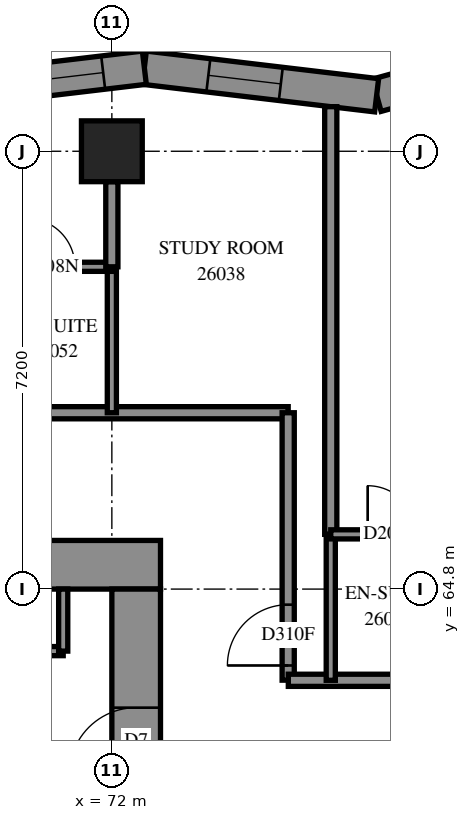
"""IFC4 building model, lengths in metres.
Left out: names, types, materials, properties, quantities, classifications, styles, units other than length and angle.
Written with IfcOpenShell. Run it as: python <this file> out.ifc"""

import sys

from ifc_helpers import new_model, si_unit, direction, frame, frame_2d, origin, origin_2d, place, context, subcontext, project, spatial, polyline, rectangle, outline, extrude, element, fill, save


model = new_model("IFC4")
c1 = context("Model", 3, precision=1e-05, world=origin(), true_north=direction((0.0, 1.0)))
c2 = subcontext(c1, "Body", "Model", "MODEL_VIEW")
j1 = project(units=[si_unit("LENGTHUNIT", "METRE"), si_unit("PLANEANGLEUNIT", "RADIAN")], contexts=[c1])
p1 = place(None, origin())
s1 = spatial("IfcSite", under=j1, at=p1, CompositionType="ELEMENT")
p2 = place(p1, origin())
s2 = spatial("IfcBuilding", under=s1, at=p2, CompositionType="ELEMENT")
p3 = place(p2, frame((0.0, 0.0, 98.2)))
s3 = spatial("IfcBuildingStorey", under=s2, at=p3, CompositionType="ELEMENT", Elevation=98.2)
p4 = place(p3, frame((72.0, 72.0, 0.0), z_axis=(0.0, 0.0, 1.0), x_axis=(1.0, 0.0, 0.0)))
e1 = element("IfcColumn", 1, at=p4, inside=s3, PredefinedType="COLUMN", context=c2, shape_type="SweptSolid", body=[
    extrude(rectangle(XDim=1.0, YDim=1.0, at=origin_2d()), origin(), (0.0, 0.0, 1.0), 3.1),
])
p5 = place(p3, frame((56.8, 65.2, -0.3), z_axis=(0.0, 0.0, 1.0), x_axis=(1.0, 0.0, 0.0)))
e2 = element("IfcWall", 2, at=p5, inside=s3, PredefinedType="SHEAR", context=c2, shape_type="SweptSolid", body=[
    extrude(rectangle(XDim=16.0, YDim=0.8, at=frame_2d((8.0, 0.0))), origin(), (0.0, 0.0, 1.0), 2.7),
])
p6 = place(p5, frame((10.8, 0.0, 0.3)))
e3 = element("IfcOpeningElement", 3, at=p6, cuts=e2, PredefinedType="OPENING", context=c2, shape_type="SweptSolid", body=[
    extrude(rectangle(XDim=0.8, YDim=2.1, at=frame_2d((0.4, 1.05))), frame((0.0, 0.41, 0.0), z_axis=(0.0, -1.0, 0.0), x_axis=(1.0, 0.0, 0.0)), (0.0, 0.0, 1.0), 0.82),
])
p7 = place(p3, frame((72.4, 50.4, -0.3), z_axis=(0.0, 0.0, 1.0), x_axis=(0.0, 1.0, 0.0)))
e4 = element("IfcWall", 4, at=p7, inside=s3, PredefinedType="SHEAR", context=c2, shape_type="SweptSolid", body=[
    extrude(rectangle(XDim=14.4, YDim=0.8, at=frame_2d((7.2, 0.0))), origin(), (0.0, 0.0, 1.0), 2.7),
])
p8 = place(p7, frame((4.55, 0.0, 0.3)))
e5 = element("IfcOpeningElement", 5, at=p8, cuts=e4, PredefinedType="OPENING", context=c2, shape_type="SweptSolid", body=[
    extrude(rectangle(XDim=1.1, YDim=2.1, at=frame_2d((0.55, 1.05))), frame((0.0, 0.41, 0.0), z_axis=(0.0, -1.0, 0.0), x_axis=(1.0, 0.0, 0.0)), (0.0, 0.0, 1.0), 0.82),
])
p9 = place(p7, frame((11.35, 0.0, 0.3)))
e6 = element("IfcOpeningElement", 6, at=p9, cuts=e4, PredefinedType="OPENING", context=c2, shape_type="SweptSolid", body=[
    extrude(rectangle(XDim=1.1, YDim=2.1, at=frame_2d((0.55, 1.05))), frame((0.0, 0.41, 0.0), z_axis=(0.0, -1.0, 0.0), x_axis=(1.0, 0.0, 0.0)), (0.0, 0.0, 1.0), 0.82),
])
p10 = place(p3, frame((79.993, 73.927, 0.0), z_axis=(0.0, 0.0, 1.0), x_axis=(-0.9637944631, -0.2666462691, 0.0)))
e7 = element("IfcWall", 7, at=p10, inside=s3, PredefinedType="SOLIDWALL", context=c2, shape_type="SweptSolid", body=[
    extrude(outline(polyline([(-0.221, -0.275), (3.721, -0.275), (3.829, 0.275), (0.221, 0.275), (-0.221, -0.275)])), origin(), (0.0, 0.0, 1.0), 3.1),
])
p11 = place(p10, frame((1.599, 0.0, 0.5)))
e8 = element("IfcOpeningElement", 8, at=p11, cuts=e7, PredefinedType="OPENING", context=c2, shape_type="SweptSolid", body=[
    extrude(rectangle(XDim=1.2, YDim=2.45, at=frame_2d((0.6, 1.225))), frame((0.0, 0.285, 0.0), z_axis=(0.0, -1.0, 0.0), x_axis=(1.0, 0.0, 0.0)), (0.0, 0.0, 1.0), 0.57),
])
p12 = place(p3, frame((76.355, 72.921, 0.0), z_axis=(0.0, 0.0, 1.0), x_axis=(-0.9930244072, 0.1179089763, 0.0)))
e9 = element("IfcWall", 9, at=p12, inside=s3, PredefinedType="SOLIDWALL", context=c2, shape_type="SweptSolid", body=[
    extrude(outline(polyline([(0.054, -0.275), (3.88, -0.275), (3.814, 0.275), (-0.054, 0.275), (0.054, -0.275)])), origin(), (0.0, 0.0, 1.0), 3.1),
])
p13 = place(p12, frame((1.587, 0.0, 0.5)))
e10 = element("IfcOpeningElement", 10, at=p13, cuts=e9, PredefinedType="OPENING", context=c2, shape_type="SweptSolid", body=[
    extrude(rectangle(XDim=1.2, YDim=2.45, at=frame_2d((0.6, 1.225))), frame((0.0, 0.285, 0.0), z_axis=(0.0, -1.0, 0.0), x_axis=(1.0, 0.0, 0.0)), (0.0, 0.0, 1.0), 0.57),
])
p14 = place(p3, frame((72.534, 73.374, 0.0), z_axis=(0.0, 0.0, 1.0), x_axis=(-0.9930269402, -0.1178876415, 0.0)))
e11 = element("IfcWall", 11, at=p14, inside=s3, PredefinedType="SOLIDWALL", context=c2, shape_type="SweptSolid", body=[
    extrude(outline(polyline([(-0.033, -0.275), (3.793, -0.275), (3.858, 0.275), (0.033, 0.275), (-0.033, -0.275)])), origin(), (0.0, 0.0, 1.0), 3.1),
])
p15 = place(p14, frame((0.682, 0.0, 0.5)))
e12 = element("IfcOpeningElement", 12, at=p15, cuts=e11, PredefinedType="OPENING", context=c2, shape_type="SweptSolid", body=[
    extrude(rectangle(XDim=1.3, YDim=2.45, at=frame_2d((0.65, 1.225))), frame((0.0, 0.285, 0.0), z_axis=(0.0, -1.0, 0.0), x_axis=(1.0, 0.0, 0.0)), (0.0, 0.0, 1.0), 0.57),
])
p16 = place(p14, frame((2.182, 0.0, 0.5)))
e13 = element("IfcOpeningElement", 13, at=p16, cuts=e11, PredefinedType="OPENING", context=c2, shape_type="SweptSolid", body=[
    extrude(rectangle(XDim=1.3, YDim=2.45, at=frame_2d((0.65, 1.225))), frame((0.0, 0.285, 0.0), z_axis=(0.0, -1.0, 0.0), x_axis=(1.0, 0.0, 0.0)), (0.0, 0.0, 1.0), 0.57),
])
p17 = place(p3, frame((64.95, 63.78, 0.0), z_axis=(0.0, 0.0, 1.0), x_axis=(1.0, 0.0, 0.0)))
e14 = element("IfcWall", 14, at=p17, inside=s3, PredefinedType="PARTITIONING", context=c2, shape_type="SweptSolid", body=[
    extrude(rectangle(XDim=6.25, YDim=0.15, at=frame_2d((3.125, 0.0))), origin(), (0.0, 0.0, 1.0), 3.1),
])
p18 = place(p3, frame((71.2, 63.78, 0.0), z_axis=(0.0, 0.0, 1.0), x_axis=(0.0, 1.0, 0.0)))
e15 = element("IfcWall", 15, at=p18, inside=s3, PredefinedType="PARTITIONING", context=c2, shape_type="SweptSolid", body=[
    extrude(rectangle(XDim=1.02, YDim=0.15, at=frame_2d((0.51, 0.0))), origin(), (0.0, 0.0, 1.0), 3.1),
])
p19 = place(p3, frame((54.7, 67.7, 0.0), z_axis=(0.0, 0.0, 1.0), x_axis=(1.0, 0.0, 0.0)))
e16 = element("IfcWall", 16, at=p19, inside=s3, PredefinedType="PARTITIONING", context=c2, shape_type="SweptSolid", body=[
    extrude(rectangle(XDim=20.2, YDim=0.2, at=frame_2d((10.1, 0.0))), origin(), (0.0, 0.0, 1.0), 3.1),
])
p20 = place(p19, frame((5.25, 0.0, 0.0)))
e17 = element("IfcOpeningElement", 17, at=p20, cuts=e16, PredefinedType="OPENING", context=c2, shape_type="SweptSolid", body=[
    extrude(rectangle(XDim=0.9, YDim=2.1, at=frame_2d((0.45, 1.05))), frame((0.0, 0.11, 0.0), z_axis=(0.0, -1.0, 0.0), x_axis=(1.0, 0.0, 0.0)), (0.0, 0.0, 1.0), 0.22),
])
p21 = place(p19, frame((6.9, 0.0, 0.0)))
e18 = element("IfcOpeningElement", 18, at=p21, cuts=e16, PredefinedType="OPENING", context=c2, shape_type="SweptSolid", body=[
    extrude(rectangle(XDim=0.9, YDim=2.1, at=frame_2d((0.45, 1.05))), frame((0.0, 0.11, 0.0), z_axis=(0.0, -1.0, 0.0), x_axis=(1.0, 0.0, 0.0)), (0.0, 0.0, 1.0), 0.22),
])
p22 = place(p19, frame((12.45, 0.0, 0.0)))
e19 = element("IfcOpeningElement", 19, at=p22, cuts=e16, PredefinedType="OPENING", context=c2, shape_type="SweptSolid", body=[
    extrude(rectangle(XDim=0.9, YDim=2.1, at=frame_2d((0.45, 1.05))), frame((0.0, 0.11, 0.0), z_axis=(0.0, -1.0, 0.0), x_axis=(1.0, 0.0, 0.0)), (0.0, 0.0, 1.0), 0.22),
])
p23 = place(p19, frame((14.1, 0.0, 0.0)))
e20 = element("IfcOpeningElement", 20, at=p23, cuts=e16, PredefinedType="OPENING", context=c2, shape_type="SweptSolid", body=[
    extrude(rectangle(XDim=0.9, YDim=2.1, at=frame_2d((0.45, 1.05))), frame((0.0, 0.11, 0.0), z_axis=(0.0, -1.0, 0.0), x_axis=(1.0, 0.0, 0.0)), (0.0, 0.0, 1.0), 0.22),
])
p24 = place(p3, frame((75.6, 65.7, 0.0), z_axis=(0.0, 0.0, 1.0), x_axis=(0.0, 1.0, 0.0)))
e21 = element("IfcWall", 21, at=p24, inside=s3, PredefinedType="PARTITIONING", context=c2, shape_type="SweptSolid", body=[
    extrude(rectangle(XDim=7.033, YDim=0.2, at=frame_2d((3.517, 0.0))), origin(), (0.0, 0.0, 1.0), 3.1),
])
p25 = place(p3, frame((74.9, 63.302, 0.0), z_axis=(0.0, 0.0, 1.0), x_axis=(0.0, 1.0, 0.0)))
e22 = element("IfcWall", 22, at=p25, inside=s3, PredefinedType="PARTITIONING", context=c2, shape_type="SweptSolid", body=[
    extrude(rectangle(XDim=4.398, YDim=0.2, at=frame_2d((2.199, 0.0))), origin(), (0.0, 0.0, 1.0), 3.1),
])
p26 = place(p25, frame((0.242, 0.0, 0.0)))
e23 = element("IfcOpeningElement", 23, at=p26, cuts=e22, PredefinedType="OPENING", context=c2, shape_type="SweptSolid", body=[
    extrude(rectangle(XDim=1.0, YDim=2.1, at=frame_2d((0.5, 1.05))), frame((0.0, 0.11, 0.0), z_axis=(0.0, -1.0, 0.0), x_axis=(1.0, 0.0, 0.0)), (0.0, 0.0, 1.0), 0.22),
])
p27 = place(p3, frame((74.902, 63.3, 0.0), z_axis=(0.0, 0.0, 1.0), x_axis=(1.0, 0.0, 0.0)))
e24 = element("IfcWall", 24, at=p27, inside=s3, PredefinedType="PARTITIONING", context=c2, shape_type="SweptSolid", body=[
    extrude(rectangle(XDim=4.298, YDim=0.2, at=frame_2d((2.149, 0.0))), origin(), (0.0, 0.0, 1.0), 3.1),
])
p28 = place(p27, frame((2.888, 0.0, 0.0)))
e25 = element("IfcOpeningElement", 25, at=p28, cuts=e24, PredefinedType="OPENING", context=c2, shape_type="SweptSolid", body=[
    extrude(rectangle(XDim=0.9, YDim=2.1, at=frame_2d((0.45, 1.05))), frame((0.0, 0.11, 0.0), z_axis=(0.0, -1.0, 0.0), x_axis=(1.0, 0.0, 0.0)), (0.0, 0.0, 1.0), 0.22),
])
for number, where, z_axis, x_axis in (
    (26, (75.6, 63.3, 0.0), (0.0, 0.0, 1.0), (0.0, 1.0, 0.0)),
    (27, (72.0, 67.7, 0.0), (0.0, 0.0, 1.0), (0.0, 1.0, 0.0)),
):
    element("IfcWall", number, at=place(p3, frame(where, z_axis=z_axis, x_axis=x_axis)), inside=s3, PredefinedType="PARTITIONING", context=c2, shape_type="SweptSolid", body=[
        extrude(rectangle(XDim=2.4, YDim=0.15, at=frame_2d((1.2, 0.0))), origin(), (0.0, 0.0, 1.0), 3.1),
    ])
p29 = place(p3, frame((75.6, 65.7, 0.0), z_axis=(0.0, 0.0, 1.0), x_axis=(1.0, 0.0, 0.0)))
e28 = element("IfcWall", 28, at=p29, inside=s3, PredefinedType="PARTITIONING", context=c2, shape_type="SweptSolid", body=[
    extrude(rectangle(XDim=1.9, YDim=0.15, at=frame_2d((0.95, 0.0))), origin(), (0.0, 0.0, 1.0), 3.1),
])
p30 = place(p29, frame((0.607, 0.0, 0.0)))
e29 = element("IfcOpeningElement", 29, at=p30, cuts=e28, PredefinedType="OPENING", context=c2, shape_type="SweptSolid", body=[
    extrude(rectangle(XDim=0.8, YDim=2.1, at=frame_2d((0.4, 1.05))), frame((0.0, 0.085, 0.0), z_axis=(0.0, -1.0, 0.0), x_axis=(1.0, 0.0, 0.0)), (0.0, 0.0, 1.0), 0.17),
])
p31 = place(p3, frame((70.1, 70.1, 0.0), z_axis=(0.0, 0.0, 1.0), x_axis=(1.0, 0.0, 0.0)))
e30 = element("IfcWall", 30, at=p31, inside=s3, PredefinedType="PARTITIONING", context=c2, shape_type="SweptSolid", body=[
    extrude(rectangle(XDim=1.9, YDim=0.15, at=frame_2d((0.95, 0.0))), origin(), (0.0, 0.0, 1.0), 3.1),
])
p32 = place(p31, frame((0.493, 0.0, 0.0)))
e31 = element("IfcOpeningElement", 31, at=p32, cuts=e30, PredefinedType="OPENING", context=c2, shape_type="SweptSolid", body=[
    extrude(rectangle(XDim=0.8, YDim=2.1, at=frame_2d((0.4, 1.05))), frame((0.0, 0.085, 0.0), z_axis=(0.0, -1.0, 0.0), x_axis=(1.0, 0.0, 0.0)), (0.0, 0.0, 1.0), 0.17),
])
p33 = place(p3, frame((72.0, 70.1, 0.0), z_axis=(0.0, 0.0, 1.0), x_axis=(0.0, 1.0, 0.0)))
e32 = element("IfcWall", 32, at=p33, inside=s3, PredefinedType="PARTITIONING", context=c2, shape_type="SweptSolid", body=[
    extrude(rectangle(XDim=1.4, YDim=0.2, at=frame_2d((0.7, 0.0))), origin(), (0.0, 0.0, 1.0), 3.1),
])
p34 = place(p13, origin())
e33 = element("IfcWindow", 33, at=p34, inside=s3, PartitioningType="SINGLE_PANEL", PredefinedType="WINDOW", context=c2, shape_type="SweptSolid", body=[
    extrude(rectangle(XDim=1.2, YDim=2.45, at=frame_2d((0.6, 1.225))), frame((0.0, 0.155, 0.0), z_axis=(0.0, -1.0, 0.0), x_axis=(1.0, 0.0, 0.0)), (0.0, 0.0, 1.0), 0.06),
])
fill(e10, e33)
p35 = place(p15, origin())
e34 = element("IfcWindow", 34, at=p35, inside=s3, PartitioningType="SINGLE_PANEL", PredefinedType="WINDOW", context=c2, shape_type="SweptSolid", body=[
    extrude(rectangle(XDim=1.3, YDim=2.45, at=frame_2d((0.65, 1.225))), frame((0.0, 0.155, 0.0), z_axis=(0.0, -1.0, 0.0), x_axis=(1.0, 0.0, 0.0)), (0.0, 0.0, 1.0), 0.06),
])
fill(e12, e34)
p36 = place(p9, origin())
e35 = element("IfcDoor", 35, at=p36, inside=s3, OperationType="SINGLE_SWING_RIGHT", PredefinedType="DOOR", context=c2, shape_type="SweptSolid", body=[
    extrude(rectangle(XDim=1.1, YDim=2.1, at=frame_2d((0.55, 1.05))), frame((0.0, 0.025, 0.0), z_axis=(0.0, -1.0, 0.0), x_axis=(1.0, 0.0, 0.0)), (0.0, 0.0, 1.0), 0.05),
])
fill(e6, e35)
p37 = place(p26, origin())
e36 = element("IfcDoor", 36, at=p37, inside=s3, OperationType="SINGLE_SWING_RIGHT", PredefinedType="DOOR", context=c2, shape_type="SweptSolid", body=[
    extrude(rectangle(XDim=1.0, YDim=2.1, at=frame_2d((0.5, 1.05))), frame((0.0, 0.025, 0.0), z_axis=(0.0, -1.0, 0.0), x_axis=(1.0, 0.0, 0.0)), (0.0, 0.0, 1.0), 0.05),
])
fill(e23, e36)
p38 = place(p30, origin())
e37 = element("IfcDoor", 37, at=p38, inside=s3, OperationType="SINGLE_SWING_RIGHT", PredefinedType="DOOR", context=c2, shape_type="SweptSolid", body=[
    extrude(rectangle(XDim=0.8, YDim=2.1, at=frame_2d((0.4, 1.05))), frame((0.0, 0.025, 0.0), z_axis=(0.0, -1.0, 0.0), x_axis=(1.0, 0.0, 0.0)), (0.0, 0.0, 1.0), 0.05),
])
fill(e29, e37)
p39 = place(p32, origin())
e38 = element("IfcDoor", 38, at=p39, inside=s3, OperationType="SINGLE_SWING_RIGHT", PredefinedType="DOOR", context=c2, shape_type="SweptSolid", body=[
    extrude(rectangle(XDim=0.8, YDim=2.1, at=frame_2d((0.4, 1.05))), frame((0.0, 0.025, 0.0), z_axis=(0.0, -1.0, 0.0), x_axis=(1.0, 0.0, 0.0)), (0.0, 0.0, 1.0), 0.05),
])
fill(e31, e38)
save(model, sys.argv[1])
